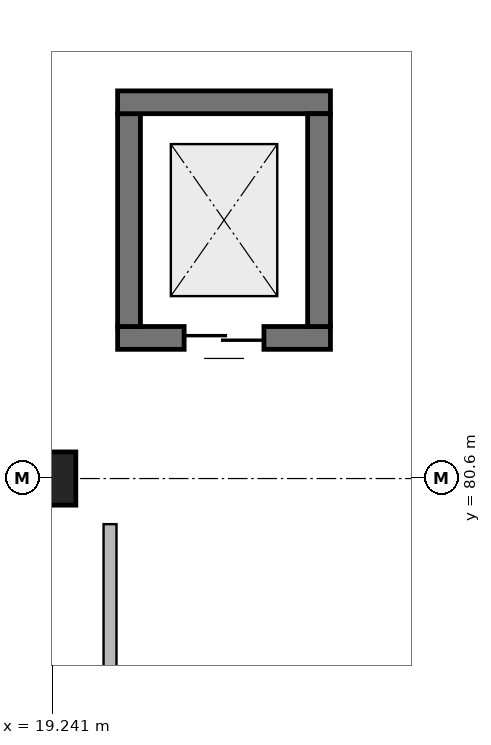
"""IFC4 building model, lengths in metres.
Left out: names, types, materials, properties, quantities, classifications, styles, units other than length and angle.
Written with IfcOpenShell. Run it as: python <this file> out.ifc"""

import sys

from ifc_helpers import new_model, si_unit, direction, frame, frame_2d, origin, origin_2d, place, context, subcontext, project, spatial, rectangle, extrude, element, fill, save


model = new_model("IFC4")
c1 = context("Model", 3, precision=1e-05, world=origin(), true_north=direction((0.0, 1.0)))
c2 = subcontext(c1, "Body", "Model", "MODEL_VIEW")
j1 = project(units=[si_unit("LENGTHUNIT", "METRE"), si_unit("PLANEANGLEUNIT", "RADIAN")], contexts=[c1])
p1 = place(None, origin())
s1 = spatial("IfcSite", under=j1, at=p1, CompositionType="ELEMENT")
p2 = place(p1, origin())
s2 = spatial("IfcBuilding", under=s1, at=p2, CompositionType="ELEMENT")
p3 = place(p2, frame((0.0, 0.0, -4.8)))
s3 = spatial("IfcBuildingStorey", under=s2, at=p3, CompositionType="ELEMENT", Elevation=-4.8)
p4 = place(p3, frame((19.2, 80.6, 0.0), z_axis=(0.0, 0.0, 1.0), x_axis=(1.0, 0.0, 0.0)))
e1 = element("IfcColumn", 1, at=p4, inside=s3, PredefinedType="COLUMN", context=c2, shape_type="SweptSolid", body=[
    extrude(rectangle(XDim=0.7, YDim=0.7, at=origin_2d()), origin(), (0.0, 0.0, 1.0), 4.8),
])
p5 = place(p3, frame((22.9, 82.45, 0.0), z_axis=(0.0, 0.0, 1.0), x_axis=(-1.0, 0.0, 0.0)))
e2 = element("IfcWall", 2, at=p5, inside=s3, PredefinedType="SOLIDWALL", context=c2, shape_type="SweptSolid", body=[
    extrude(rectangle(XDim=2.8, YDim=0.3, at=frame_2d((1.4, 0.0))), origin(), (0.0, 0.0, 1.0), 4.8),
])
p6 = place(p5, frame((0.875, 0.0, 0.0)))
e3 = element("IfcOpeningElement", 3, at=p6, cuts=e2, PredefinedType="OPENING", context=c2, shape_type="SweptSolid", body=[
    extrude(rectangle(XDim=1.05, YDim=2.15, at=frame_2d((0.525, 1.075))), frame((0.0, 0.17, 0.0), z_axis=(0.0, -1.0, 0.0), x_axis=(1.0, 0.0, 0.0)), (0.0, 0.0, 1.0), 0.34),
])
for number, where, z_axis, x_axis in (
    (4, (20.25, 82.6, 0.0), (0.0, 0.0, 1.0), (0.0, 1.0, 0.0)),
    (5, (20.1, 85.55, 0.0), (0.0, 0.0, 1.0), (1.0, 0.0, 0.0)),
    (6, (22.75, 85.4, 0.0), (0.0, 0.0, 1.0), (0.0, -1.0, 0.0)),
):
    element("IfcWall", number, at=place(p3, frame(where, z_axis=z_axis, x_axis=x_axis)), inside=s3, PredefinedType="SOLIDWALL", context=c2, shape_type="SweptSolid", body=[
        extrude(rectangle(XDim=2.8, YDim=0.3, at=frame_2d((1.4, 0.0))), origin(), (0.0, 0.0, 1.0), 4.8),
    ])
p7 = place(p3, frame((20.0, 73.54, 0.0), z_axis=(0.0, 0.0, 1.0), x_axis=(0.0, 1.0, 0.0)))
e7 = element("IfcWall", 7, at=p7, inside=s3, PredefinedType="PARTITIONING", context=c2, shape_type="SweptSolid", body=[
    extrude(rectangle(XDim=6.46, YDim=0.17, at=frame_2d((3.23, 0.0))), origin(), (0.0, 0.0, 1.0), 4.54),
])
p8 = place(p6, origin())
e8 = element("IfcDoor", 8, at=p8, inside=s3, OperationType="DOUBLE_DOOR_SLIDING", PredefinedType="DOOR", context=c2, shape_type="SweptSolid", body=[
    extrude(rectangle(XDim=1.05, YDim=2.15, at=frame_2d((0.525, 1.075))), frame((0.0, 0.025, 0.0), z_axis=(0.0, -1.0, 0.0), x_axis=(1.0, 0.0, 0.0)), (0.0, 0.0, 1.0), 0.05),
])
fill(e3, e8)
save(model, sys.argv[1])
